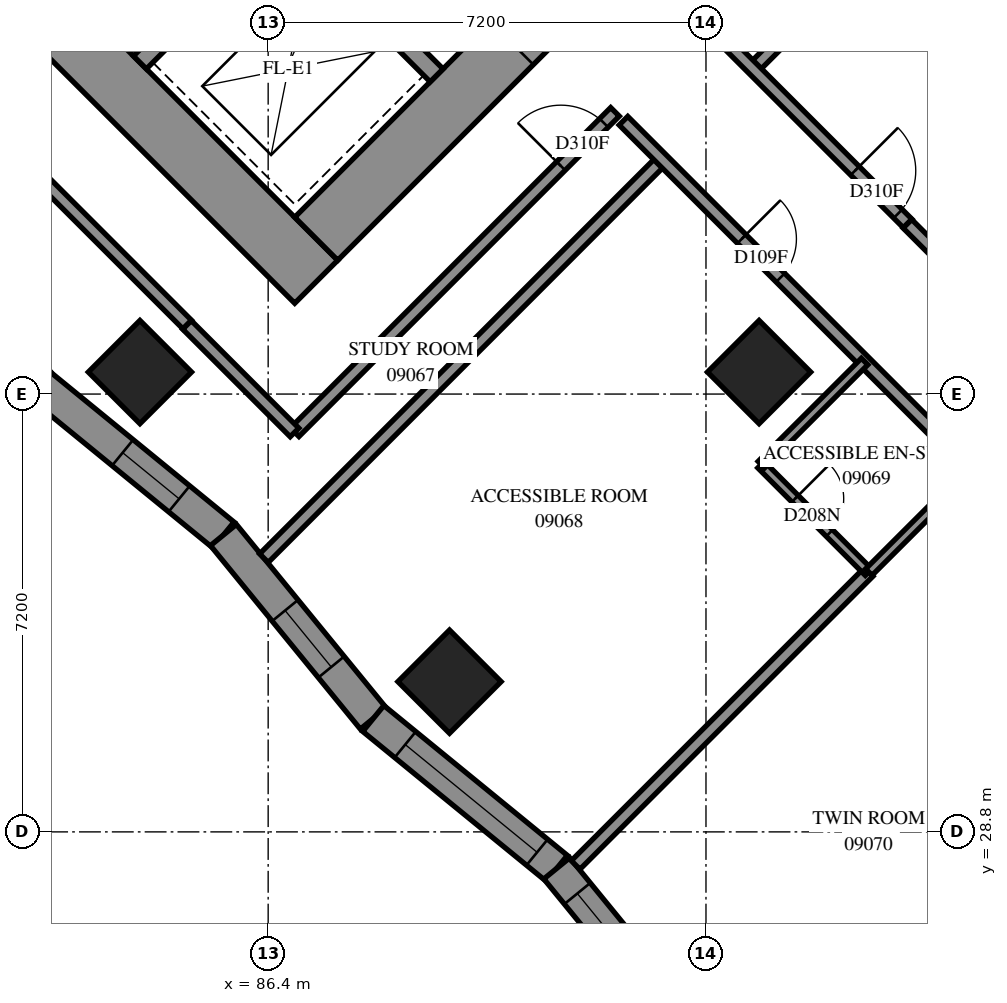
"""IFC4 building model, lengths in metres.
Left out: names, types, materials, properties, quantities, classifications, styles, units other than length and angle.
Written with IfcOpenShell. Run it as: python <this file> out.ifc"""

import sys

from ifc_helpers import new_model, si_unit, direction, frame, frame_2d, origin, origin_2d, place, context, subcontext, project, spatial, polyline, rectangle, outline, extrude, element, fill, save


model = new_model("IFC4")
c1 = context("Model", 3, precision=1e-05, world=origin(), true_north=direction((0.0, 1.0)))
c2 = subcontext(c1, "Body", "Model", "MODEL_VIEW")
j1 = project(units=[si_unit("LENGTHUNIT", "METRE"), si_unit("PLANEANGLEUNIT", "RADIAN")], contexts=[c1])
p1 = place(None, origin())
s1 = spatial("IfcSite", under=j1, at=p1, CompositionType="ELEMENT")
p2 = place(p1, origin())
s2 = spatial("IfcBuilding", under=s1, at=p2, CompositionType="ELEMENT")
p3 = place(p2, frame((0.0, 0.0, 37.2)))
s3 = spatial("IfcBuildingStorey", under=s2, at=p3, CompositionType="ELEMENT", Elevation=37.2)
for number, where, z_axis, x_axis in (
    (1, (84.291, 36.362, 0.0), (0.0, 0.0, 1.0), (0.707, -0.707, 0.0)),
    (2, (94.474, 36.362, 0.0), (0.0, 0.0, 1.0), (0.707, -0.707, 0.0)),
    (3, (89.382, 31.271, 0.0), (0.0, 0.0, 1.0), (0.707, -0.707, 0.0)),
):
    element("IfcColumn", number, at=place(p3, frame(where, z_axis=z_axis, x_axis=x_axis)), inside=s3, PredefinedType="COLUMN", context=c2, shape_type="SweptSolid", body=[
        extrude(rectangle(XDim=1.2, YDim=1.2, at=origin_2d()), origin(), (0.0, 0.0, 1.0), 3.1),
    ])
p4 = place(p3, frame((75.594, 49.443, -0.3), z_axis=(0.0, 0.0, 1.0), x_axis=(0.7071037324, -0.70710983, 0.0)))
e4 = element("IfcWall", 4, at=p4, inside=s3, PredefinedType="SHEAR", context=c2, shape_type="SweptSolid", body=[
    extrude(rectangle(XDim=16.4, YDim=1.0, at=frame_2d((8.2, 0.0))), origin(), (0.0, 0.0, 1.0), 2.7),
])
p5 = place(p3, frame((87.19, 38.554, -0.3), z_axis=(0.0, 0.0, 1.0), x_axis=(0.707103309, 0.7071102534, 0.0)))
e5 = element("IfcWall", 5, at=p5, inside=s3, PredefinedType="SHEAR", context=c2, shape_type="SweptSolid", body=[
    extrude(rectangle(XDim=14.4, YDim=1.0, at=frame_2d((7.2, 0.0))), origin(), (0.0, 0.0, 1.0), 2.7),
])
p6 = place(p5, frame((4.55, 0.0, 0.3)))
e6 = element("IfcOpeningElement", 6, at=p6, cuts=e5, PredefinedType="OPENING", context=c2, shape_type="SweptSolid", body=[
    extrude(rectangle(XDim=1.1, YDim=2.1, at=frame_2d((0.55, 1.05))), frame((0.0, 0.51, 0.0), z_axis=(0.0, -1.0, 0.0), x_axis=(1.0, 0.0, 0.0)), (0.0, 0.0, 1.0), 1.02),
])
p7 = place(p5, frame((11.35, 0.0, 0.3)))
e7 = element("IfcOpeningElement", 7, at=p7, cuts=e5, PredefinedType="OPENING", context=c2, shape_type="SweptSolid", body=[
    extrude(rectangle(XDim=1.1, YDim=2.1, at=frame_2d((0.55, 1.05))), frame((0.0, 0.51, 0.0), z_axis=(0.0, -1.0, 0.0), x_axis=(1.0, 0.0, 0.0)), (0.0, 0.0, 1.0), 1.02),
])
p8 = place(p3, frame((84.291, 41.453, 0.0), z_axis=(0.0, 0.0, 1.0), x_axis=(0.7071067812, 0.7071067812, 0.0)))
e8 = element("IfcWall", 8, at=p8, inside=s3, PredefinedType="SOLIDWALL", context=c2, shape_type="SweptSolid", body=[
    extrude(rectangle(XDim=3.3, YDim=0.3, at=frame_2d((1.65, 0.0))), origin(), (0.0, 0.0, 1.0), 3.1),
])
p9 = place(p3, frame((78.988, 51.423, 0.0), z_axis=(0.0, 0.0, 1.0), x_axis=(0.7071067812, -0.7071067812, 0.0)))
e9 = element("IfcWall", 9, at=p9, inside=s3, PredefinedType="SOLIDWALL", context=c2, shape_type="SweptSolid", body=[
    extrude(rectangle(XDim=14.4, YDim=0.3, at=frame_2d((7.2, 0.0))), origin(), (0.0, 0.0, 1.0), 3.1),
])
p10 = place(p9, frame((1.25, 0.0, 0.0)))
e10 = element("IfcOpeningElement", 10, at=p10, cuts=e9, PredefinedType="OPENING", context=c2, shape_type="SweptSolid", body=[
    extrude(rectangle(XDim=1.1, YDim=2.1, at=frame_2d((0.55, 1.05))), frame((0.0, 0.16, 0.0), z_axis=(0.0, -1.0, 0.0), x_axis=(1.0, 0.0, 0.0)), (0.0, 0.0, 1.0), 0.32),
])
p11 = place(p9, frame((4.85, 0.0, 0.0)))
e11 = element("IfcOpeningElement", 11, at=p11, cuts=e9, PredefinedType="OPENING", context=c2, shape_type="SweptSolid", body=[
    extrude(rectangle(XDim=1.1, YDim=2.1, at=frame_2d((0.55, 1.05))), frame((0.0, 0.16, 0.0), z_axis=(0.0, -1.0, 0.0), x_axis=(1.0, 0.0, 0.0)), (0.0, 0.0, 1.0), 0.32),
])
p12 = place(p9, frame((8.45, 0.0, 0.0)))
e12 = element("IfcOpeningElement", 12, at=p12, cuts=e9, PredefinedType="OPENING", context=c2, shape_type="SweptSolid", body=[
    extrude(rectangle(XDim=1.1, YDim=2.1, at=frame_2d((0.55, 1.05))), frame((0.0, 0.16, 0.0), z_axis=(0.0, -1.0, 0.0), x_axis=(1.0, 0.0, 0.0)), (0.0, 0.0, 1.0), 0.32),
])
p13 = place(p9, frame((12.05, 0.0, 0.0)))
e13 = element("IfcOpeningElement", 13, at=p13, cuts=e9, PredefinedType="OPENING", context=c2, shape_type="SweptSolid", body=[
    extrude(rectangle(XDim=1.1, YDim=2.1, at=frame_2d((0.55, 1.05))), frame((0.0, 0.16, 0.0), z_axis=(0.0, -1.0, 0.0), x_axis=(1.0, 0.0, 0.0)), (0.0, 0.0, 1.0), 0.32),
])
p14 = place(p3, frame((82.647, 36.147, 0.0), z_axis=(0.0, 0.0, 1.0), x_axis=(0.7745059294, -0.6325666489, 0.0)))
e14 = element("IfcWall", 14, at=p14, inside=s3, PredefinedType="SOLIDWALL", context=c2, shape_type="SweptSolid", body=[
    extrude(outline(polyline([(-0.028, -0.275), (3.868, -0.275), (3.924, 0.275), (0.028, 0.275), (-0.028, -0.275)])), origin(), (0.0, 0.0, 1.0), 3.1),
])
p15 = place(p14, frame((1.756, 0.0, 0.5)))
e15 = element("IfcOpeningElement", 15, at=p15, cuts=e14, PredefinedType="OPENING", context=c2, shape_type="SweptSolid", body=[
    extrude(rectangle(XDim=1.2, YDim=2.45, at=frame_2d((0.6, 1.225))), frame((0.0, 0.285, 0.0), z_axis=(0.0, -1.0, 0.0), x_axis=(1.0, 0.0, 0.0)), (0.0, 0.0, 1.0), 0.57),
])
p16 = place(p3, frame((85.665, 33.682, 0.0), z_axis=(0.0, 0.0, 1.0), x_axis=(0.6325666489, -0.7745059294, 0.0)))
e16 = element("IfcWall", 16, at=p16, inside=s3, PredefinedType="SOLIDWALL", context=c2, shape_type="SweptSolid", body=[
    extrude(outline(polyline([(0.028, -0.275), (3.924, -0.275), (3.868, 0.275), (-0.028, 0.275), (0.028, -0.275)])), origin(), (0.0, 0.0, 1.0), 3.1),
])
p17 = place(p16, frame((1.603, 0.0, 0.5)))
e17 = element("IfcOpeningElement", 17, at=p17, cuts=e16, PredefinedType="OPENING", context=c2, shape_type="SweptSolid", body=[
    extrude(rectangle(XDim=1.2, YDim=2.45, at=frame_2d((0.6, 1.225))), frame((0.0, 0.285, 0.0), z_axis=(0.0, -1.0, 0.0), x_axis=(1.0, 0.0, 0.0)), (0.0, 0.0, 1.0), 0.57),
])
p18 = place(p3, frame((88.129, 30.665, 0.0), z_axis=(0.0, 0.0, 1.0), x_axis=(0.774508234, -0.6325638271, 0.0)))
e18 = element("IfcWall", 18, at=p18, inside=s3, PredefinedType="SOLIDWALL", context=c2, shape_type="SweptSolid", body=[
    extrude(outline(polyline([(-0.028, -0.275), (3.868, -0.275), (3.924, 0.275), (0.028, 0.275), (-0.028, -0.275)])), origin(), (0.0, 0.0, 1.0), 3.1),
])
p19 = place(p18, frame((0.678, 0.0, 0.5)))
e19 = element("IfcOpeningElement", 19, at=p19, cuts=e18, PredefinedType="OPENING", context=c2, shape_type="SweptSolid", body=[
    extrude(rectangle(XDim=2.8, YDim=2.45, at=frame_2d((1.4, 1.225))), frame((0.0, 0.285, 0.0), z_axis=(0.0, -1.0, 0.0), x_axis=(1.0, 0.0, 0.0)), (0.0, 0.0, 1.0), 0.57),
])
p20 = place(p3, frame((91.146, 28.2, 0.0), z_axis=(0.0, 0.0, 1.0), x_axis=(0.6325666489, -0.7745059294, 0.0)))
e20 = element("IfcWall", 20, at=p20, inside=s3, PredefinedType="SOLIDWALL", context=c2, shape_type="SweptSolid", body=[
    extrude(outline(polyline([(0.028, -0.275), (3.924, -0.275), (3.868, 0.275), (-0.028, 0.275), (0.028, -0.275)])), origin(), (0.0, 0.0, 1.0), 3.1),
])
p21 = place(p20, frame((0.534, 0.0, 0.5)))
e21 = element("IfcOpeningElement", 21, at=p21, cuts=e20, PredefinedType="OPENING", context=c2, shape_type="SweptSolid", body=[
    extrude(rectangle(XDim=2.8, YDim=2.45, at=frame_2d((1.4, 1.225))), frame((0.0, 0.285, 0.0), z_axis=(0.0, -1.0, 0.0), x_axis=(1.0, 0.0, 0.0)), (0.0, 0.0, 1.0), 0.57),
])
p22 = place(p3, frame((94.367, 41.349, 0.0), z_axis=(0.0, 0.0, 1.0), x_axis=(0.7071109931, 0.7071025693, 0.0)))
e22 = element("IfcWall", 22, at=p22, inside=s3, PredefinedType="PARTITIONING", context=c2, shape_type="SweptSolid", body=[
    extrude(rectangle(XDim=11.871, YDim=0.2, at=frame_2d((5.936, 0.0))), origin(), (0.0, 0.0, 1.0), 3.1),
])
p23 = place(p3, frame((86.33, 33.302, 0.0), z_axis=(0.0, 0.0, 1.0), x_axis=(0.7069989149, 0.707214631, 0.0)))
e23 = element("IfcWall", 23, at=p23, inside=s3, PredefinedType="PARTITIONING", context=c2, shape_type="SweptSolid", body=[
    extrude(rectangle(XDim=9.271, YDim=0.2, at=frame_2d((4.636, 0.0))), origin(), (0.0, 0.0, 1.0), 3.1),
])
p24 = place(p3, frame((92.243, 40.495, 0.0), z_axis=(0.0, 0.0, 1.0), x_axis=(0.7071067812, -0.7071067812, 0.0)))
e24 = element("IfcWall", 24, at=p24, inside=s3, PredefinedType="PARTITIONING", context=c2, shape_type="SweptSolid", body=[
    extrude(rectangle(XDim=8.101, YDim=0.2, at=frame_2d((4.05, 0.0))), origin(), (0.0, 0.0, 1.0), 3.1),
])
p25 = place(p24, frame((2.75, 0.0, 0.0)))
e25 = element("IfcOpeningElement", 25, at=p25, cuts=e24, PredefinedType="OPENING", context=c2, shape_type="SweptSolid", body=[
    extrude(rectangle(XDim=0.9, YDim=2.1, at=frame_2d((0.45, 1.05))), frame((0.0, 0.11, 0.0), z_axis=(0.0, -1.0, 0.0), x_axis=(1.0, 0.0, 0.0)), (0.0, 0.0, 1.0), 0.22),
])
p26 = place(p3, frame((86.836, 35.372, 0.0), z_axis=(0.0, 0.0, 1.0), x_axis=(0.7071067812, 0.7071067812, 0.0)))
e26 = element("IfcWall", 26, at=p26, inside=s3, PredefinedType="PARTITIONING", context=c2, shape_type="SweptSolid", body=[
    extrude(rectangle(XDim=7.45, YDim=0.2, at=frame_2d((3.725, 0.0))), origin(), (0.0, 0.0, 1.0), 3.1),
])
p27 = place(p26, frame((6.192, 0.0, 0.0)))
e27 = element("IfcOpeningElement", 27, at=p27, cuts=e26, PredefinedType="OPENING", context=c2, shape_type="SweptSolid", body=[
    extrude(rectangle(XDim=1.0, YDim=2.1, at=frame_2d((0.5, 1.05))), frame((0.0, 0.11, 0.0), z_axis=(0.0, -1.0, 0.0), x_axis=(1.0, 0.0, 0.0)), (0.0, 0.0, 1.0), 0.22),
])
p28 = place(p3, frame((96.534, 23.151, 0.0), z_axis=(0.0, 0.0, 1.0), x_axis=(0.7071067812, 0.7071067812, 0.0)))
e28 = element("IfcWall", 28, at=p28, inside=s3, PredefinedType="PARTITIONING", context=c2, shape_type="SweptSolid", body=[
    extrude(rectangle(XDim=6.835, YDim=0.2, at=frame_2d((3.417, 0.0))), origin(), (0.0, 0.0, 1.0), 3.1),
])
p29 = place(p3, frame((91.457, 28.255, 0.0), z_axis=(0.0, 0.0, 1.0), x_axis=(0.7071067812, 0.7071067812, 0.0)))
e29 = element("IfcWall", 29, at=p29, inside=s3, PredefinedType="PARTITIONING", context=c2, shape_type="SweptSolid", body=[
    extrude(rectangle(XDim=6.815, YDim=0.2, at=frame_2d((3.408, 0.0))), origin(), (0.0, 0.0, 1.0), 3.1),
])
p30 = place(p3, frame((85.07, 37.142, 0.0), z_axis=(0.0, 0.0, 1.0), x_axis=(-0.7070899851, 0.7071235769, 0.0)))
e30 = element("IfcWall", 30, at=p30, inside=s3, PredefinedType="PARTITIONING", context=c2, shape_type="SweptSolid", body=[
    extrude(rectangle(XDim=5.954, YDim=0.2, at=frame_2d((2.977, 0.0))), origin(), (0.0, 0.0, 1.0), 3.1),
])
p31 = place(p3, frame((93.735, 41.987, 0.0), z_axis=(0.0, 0.0, 1.0), x_axis=(0.7071067812, -0.7071067812, 0.0)))
e31 = element("IfcWall", 31, at=p31, inside=s3, PredefinedType="PARTITIONING", context=c2, shape_type="SweptSolid", body=[
    extrude(rectangle(XDim=4.5, YDim=0.2, at=frame_2d((2.25, 0.0))), origin(), (0.0, 0.0, 1.0), 3.1),
])
p32 = place(p31, frame((3.274, 0.0, 0.0)))
e32 = element("IfcOpeningElement", 32, at=p32, cuts=e31, PredefinedType="OPENING", context=c2, shape_type="SweptSolid", body=[
    extrude(rectangle(XDim=1.0, YDim=2.1, at=frame_2d((0.5, 1.05))), frame((0.0, 0.11, 0.0), z_axis=(0.0, -1.0, 0.0), x_axis=(1.0, 0.0, 0.0)), (0.0, 0.0, 1.0), 0.22),
])
p33 = place(p3, frame((96.913, 38.801, 0.0), z_axis=(0.0, 0.0, 1.0), x_axis=(0.7068288851, -0.7073845681, 0.0)))
e33 = element("IfcWall", 33, at=p33, inside=s3, PredefinedType="PARTITIONING", context=c2, shape_type="SweptSolid", body=[
    extrude(rectangle(XDim=3.599, YDim=0.2, at=frame_2d((1.8, 0.0))), origin(), (0.0, 0.0, 1.0), 3.1),
])
p34 = place(p3, frame((85.065, 37.137, 0.0), z_axis=(0.0, 0.0, 1.0), x_axis=(0.7071067812, -0.7071067812, 0.0)))
e34 = element("IfcWall", 34, at=p34, inside=s3, PredefinedType="PARTITIONING", context=c2, shape_type="SweptSolid", body=[
    extrude(rectangle(XDim=2.5, YDim=0.2, at=frame_2d((1.25, 0.0))), origin(), (0.0, 0.0, 1.0), 3.1),
])
p35 = place(p3, frame((94.505, 34.839, 0.0), z_axis=(0.0, 0.0, 1.0), x_axis=(0.7071067812, -0.7071067812, 0.0)))
e35 = element("IfcWall", 35, at=p35, inside=s3, PredefinedType="PARTITIONING", context=c2, shape_type="SweptSolid", body=[
    extrude(rectangle(XDim=2.5, YDim=0.15, at=frame_2d((1.25, 0.0))), origin(), (0.0, 0.0, 1.0), 3.1),
])
p36 = place(p35, frame((0.792, 0.0, 0.0)))
e36 = element("IfcOpeningElement", 36, at=p36, cuts=e35, PredefinedType="OPENING", context=c2, shape_type="SweptSolid", body=[
    extrude(rectangle(XDim=0.8, YDim=2.1, at=frame_2d((0.4, 1.05))), frame((0.0, 0.085, 0.0), z_axis=(0.0, -1.0, 0.0), x_axis=(1.0, 0.0, 0.0)), (0.0, 0.0, 1.0), 0.17),
])
for number, where, z_axis, x_axis in (
    (37, (96.278, 33.072, 0.0), (0.0, 0.0, 1.0), (0.708, 0.707, 0.0)),
    (38, (94.511, 34.839, 0.0), (0.0, 0.0, 1.0), (0.708, 0.707, 0.0)),
):
    element("IfcWall", number, at=place(p3, frame(where, z_axis=z_axis, x_axis=x_axis)), inside=s3, PredefinedType="PARTITIONING", context=c2, shape_type="SweptSolid", body=[
        extrude(rectangle(XDim=2.4, YDim=0.15, at=frame_2d((1.2, 0.0))), origin(), (0.0, 0.0, 1.0), 3.1),
    ])
p37 = place(p15, origin())
e39 = element("IfcWindow", 39, at=p37, inside=s3, PartitioningType="SINGLE_PANEL", PredefinedType="WINDOW", context=c2, shape_type="SweptSolid", body=[
    extrude(rectangle(XDim=1.2, YDim=2.45, at=frame_2d((0.6, 1.225))), frame((0.0, 0.155, 0.0), z_axis=(0.0, -1.0, 0.0), x_axis=(1.0, 0.0, 0.0)), (0.0, 0.0, 1.0), 0.06),
])
fill(e15, e39)
p38 = place(p17, origin())
e40 = element("IfcWindow", 40, at=p38, inside=s3, PartitioningType="SINGLE_PANEL", PredefinedType="WINDOW", context=c2, shape_type="SweptSolid", body=[
    extrude(rectangle(XDim=1.2, YDim=2.45, at=frame_2d((0.6, 1.225))), frame((0.0, 0.155, 0.0), z_axis=(0.0, -1.0, 0.0), x_axis=(1.0, 0.0, 0.0)), (0.0, 0.0, 1.0), 0.06),
])
fill(e17, e40)
p39 = place(p19, origin())
e41 = element("IfcWindow", 41, at=p39, inside=s3, PartitioningType="SINGLE_PANEL", PredefinedType="WINDOW", context=c2, shape_type="SweptSolid", body=[
    extrude(rectangle(XDim=2.8, YDim=2.45, at=frame_2d((1.4, 1.225))), frame((0.0, 0.155, 0.0), z_axis=(0.0, -1.0, 0.0), x_axis=(1.0, 0.0, 0.0)), (0.0, 0.0, 1.0), 0.06),
])
fill(e19, e41)
p40 = place(p21, origin())
e42 = element("IfcWindow", 42, at=p40, inside=s3, PartitioningType="SINGLE_PANEL", PredefinedType="WINDOW", context=c2, shape_type="SweptSolid", body=[
    extrude(rectangle(XDim=2.8, YDim=2.45, at=frame_2d((1.4, 1.225))), frame((0.0, 0.155, 0.0), z_axis=(0.0, -1.0, 0.0), x_axis=(1.0, 0.0, 0.0)), (0.0, 0.0, 1.0), 0.06),
])
fill(e21, e42)
p41 = place(p32, origin())
e43 = element("IfcDoor", 43, at=p41, inside=s3, OperationType="SINGLE_SWING_RIGHT", PredefinedType="DOOR", context=c2, shape_type="SweptSolid", body=[
    extrude(rectangle(XDim=1.0, YDim=2.1, at=frame_2d((0.5, 1.05))), frame((0.0, 0.025, 0.0), z_axis=(0.0, -1.0, 0.0), x_axis=(1.0, 0.0, 0.0)), (0.0, 0.0, 1.0), 0.05),
])
fill(e32, e43)
p42 = place(p27, origin())
e44 = element("IfcDoor", 44, at=p42, inside=s3, OperationType="SINGLE_SWING_RIGHT", PredefinedType="DOOR", context=c2, shape_type="SweptSolid", body=[
    extrude(rectangle(XDim=1.0, YDim=2.1, at=frame_2d((0.5, 1.05))), frame((0.0, 0.025, 0.0), z_axis=(0.0, -1.0, 0.0), x_axis=(1.0, 0.0, 0.0)), (0.0, 0.0, 1.0), 0.05),
])
fill(e27, e44)
p43 = place(p25, origin())
e45 = element("IfcDoor", 45, at=p43, inside=s3, OperationType="SINGLE_SWING_LEFT", PredefinedType="DOOR", context=c2, shape_type="SweptSolid", body=[
    extrude(rectangle(XDim=0.9, YDim=2.1, at=frame_2d((0.45, 1.05))), frame((0.0, 0.025, 0.0), z_axis=(0.0, -1.0, 0.0), x_axis=(1.0, 0.0, 0.0)), (0.0, 0.0, 1.0), 0.05),
])
fill(e25, e45)
p44 = place(p36, origin())
e46 = element("IfcDoor", 46, at=p44, inside=s3, OperationType="SINGLE_SWING_RIGHT", PredefinedType="DOOR", context=c2, shape_type="SweptSolid", body=[
    extrude(rectangle(XDim=0.8, YDim=2.1, at=frame_2d((0.4, 1.05))), frame((0.0, 0.025, 0.0), z_axis=(0.0, -1.0, 0.0), x_axis=(1.0, 0.0, 0.0)), (0.0, 0.0, 1.0), 0.05),
])
fill(e36, e46)
save(model, sys.argv[1])
